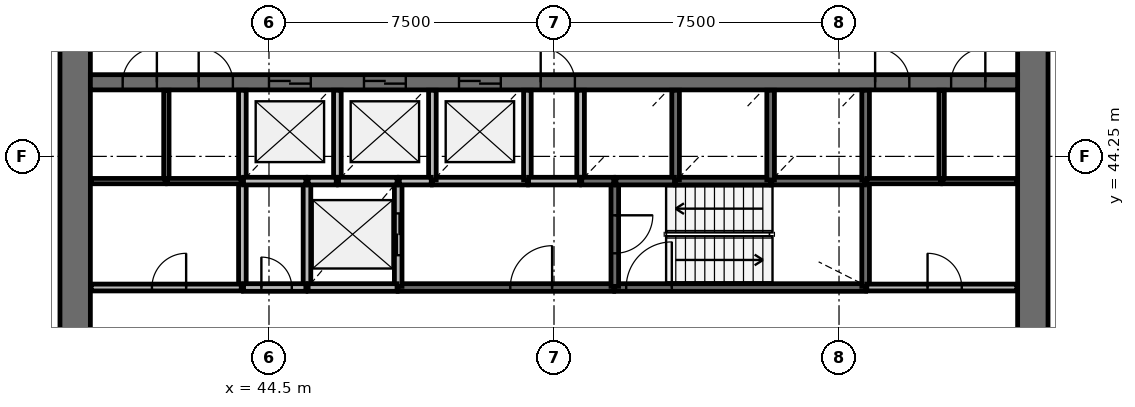
"""IFC4 building model, lengths in metres.
Left out: names, types, materials, properties, quantities, classifications, styles, units other than length and angle.
Written with IfcOpenShell. Run it as: python <this file> out.ifc"""

import sys

from ifc_helpers import new_model, si_unit, direction, frame, frame_2d, origin, place, context, subcontext, project, spatial, rectangle, extrude, source, transform, mapped, element, fill, save


model = new_model("IFC4")
c1 = context("Model", 3, precision=1e-05, world=origin(), true_north=direction((0.0, 1.0)))
c2 = subcontext(c1, "Body", "Model", "MODEL_VIEW")
j1 = project(units=[si_unit("LENGTHUNIT", "METRE"), si_unit("PLANEANGLEUNIT", "RADIAN")], contexts=[c1])
p1 = place(None, origin())
s1 = spatial("IfcSite", under=j1, at=p1, CompositionType="ELEMENT")
p2 = place(p1, origin())
s2 = spatial("IfcBuilding", under=s1, at=p2, CompositionType="ELEMENT")
p3 = place(p2, frame((0.0, 0.0, 83.9)))
s3 = spatial("IfcBuildingStorey", under=s2, at=p3, CompositionType="ELEMENT", Elevation=83.9)
p4 = place(p3, frame((64.6, 38.0, 0.0), z_axis=(0.0, 0.0, 1.0), x_axis=(0.0, 1.0, 0.0)))
e1 = element("IfcWall", 1, at=p4, inside=s3, PredefinedType="SHEAR", context=c2, shape_type="SweptSolid", body=[
    extrude(rectangle(XDim=20.0, YDim=0.8, at=frame_2d((10.0, 0.0))), origin(), (0.0, 0.0, 1.0), 4.1),
])
p5 = place(p4, frame((9.1, 0.0, 0.0)))
e2 = element("IfcOpeningElement", 2, at=p5, cuts=e1, PredefinedType="OPENING", context=c2, shape_type="SweptSolid", body=[
    extrude(rectangle(XDim=1.8, YDim=2.1, at=frame_2d((0.9, 1.05))), frame((0.0, 0.41, 0.0), z_axis=(0.0, -1.0, 0.0), x_axis=(1.0, 0.0, 0.0)), (0.0, 0.0, 1.0), 0.82),
])
p6 = place(p3, frame((39.4, 58.0, 0.0), z_axis=(0.0, 0.0, 1.0), x_axis=(0.0, -1.0, 0.0)))
e3 = element("IfcWall", 3, at=p6, inside=s3, PredefinedType="SHEAR", context=c2, shape_type="SweptSolid", body=[
    extrude(rectangle(XDim=20.0, YDim=0.8, at=frame_2d((10.0, 0.0))), origin(), (0.0, 0.0, 1.0), 4.1),
])
p7 = place(p6, frame((9.1, 0.0, 0.0)))
e4 = element("IfcOpeningElement", 4, at=p7, cuts=e3, PredefinedType="OPENING", context=c2, shape_type="SweptSolid", body=[
    extrude(rectangle(XDim=1.8, YDim=2.1, at=frame_2d((0.9, 1.05))), frame((0.0, 0.41, 0.0), z_axis=(0.0, -1.0, 0.0), x_axis=(1.0, 0.0, 0.0)), (0.0, 0.0, 1.0), 0.82),
])
p8 = place(p3, frame((39.8, 46.2, 0.0), z_axis=(0.0, 0.0, 1.0), x_axis=(1.0, 0.0, 0.0)))
e5 = element("IfcWall", 5, at=p8, inside=s3, PredefinedType="SHEAR", context=c2, shape_type="SweptSolid", body=[
    extrude(rectangle(XDim=24.4, YDim=0.4, at=frame_2d((12.2, 0.0))), origin(), (0.0, 0.0, 1.0), 4.1),
])
p9 = place(p8, frame((4.7, 0.0, 0.0)))
e6 = element("IfcOpeningElement", 6, at=p9, cuts=e5, PredefinedType="OPENING", context=c2, shape_type="SweptSolid", body=[
    extrude(rectangle(XDim=1.1, YDim=2.1, at=frame_2d((0.55, 1.05))), frame((0.0, 0.21, 0.0), z_axis=(0.0, -1.0, 0.0), x_axis=(1.0, 0.0, 0.0)), (0.0, 0.0, 1.0), 0.42),
])
p10 = place(p8, frame((7.2, 0.0, 0.0)))
e7 = element("IfcOpeningElement", 7, at=p10, cuts=e5, PredefinedType="OPENING", context=c2, shape_type="SweptSolid", body=[
    extrude(rectangle(XDim=1.1, YDim=2.1, at=frame_2d((0.55, 1.05))), frame((0.0, 0.21, 0.0), z_axis=(0.0, -1.0, 0.0), x_axis=(1.0, 0.0, 0.0)), (0.0, 0.0, 1.0), 0.42),
])
p11 = place(p8, frame((9.7, 0.0, 0.0)))
e8 = element("IfcOpeningElement", 8, at=p11, cuts=e5, PredefinedType="OPENING", context=c2, shape_type="SweptSolid", body=[
    extrude(rectangle(XDim=1.1, YDim=2.1, at=frame_2d((0.55, 1.05))), frame((0.0, 0.21, 0.0), z_axis=(0.0, -1.0, 0.0), x_axis=(1.0, 0.0, 0.0)), (0.0, 0.0, 1.0), 0.42),
])
p12 = place(p8, frame((20.65, 0.0, 0.0)))
e9 = element("IfcOpeningElement", 9, at=p12, cuts=e5, PredefinedType="OPENING", context=c2, shape_type="SweptSolid", body=[
    extrude(rectangle(XDim=0.9, YDim=2.1, at=frame_2d((0.45, 1.05))), frame((0.0, 0.21, 0.0), z_axis=(0.0, -1.0, 0.0), x_axis=(1.0, 0.0, 0.0)), (0.0, 0.0, 1.0), 0.42),
])
p13 = place(p8, frame((22.65, 0.0, 0.0)))
e10 = element("IfcOpeningElement", 10, at=p13, cuts=e5, PredefinedType="OPENING", context=c2, shape_type="SweptSolid", body=[
    extrude(rectangle(XDim=0.9, YDim=2.1, at=frame_2d((0.45, 1.05))), frame((0.0, 0.21, 0.0), z_axis=(0.0, -1.0, 0.0), x_axis=(1.0, 0.0, 0.0)), (0.0, 0.0, 1.0), 0.42),
])
p14 = place(p8, frame((0.85, 0.0, 0.0)))
e11 = element("IfcOpeningElement", 11, at=p14, cuts=e5, PredefinedType="OPENING", context=c2, shape_type="SweptSolid", body=[
    extrude(rectangle(XDim=0.9, YDim=2.1, at=frame_2d((0.45, 1.05))), frame((0.0, 0.21, 0.0), z_axis=(0.0, -1.0, 0.0), x_axis=(1.0, 0.0, 0.0)), (0.0, 0.0, 1.0), 0.42),
])
p15 = place(p8, frame((2.85, 0.0, 0.0)))
e12 = element("IfcOpeningElement", 12, at=p15, cuts=e5, PredefinedType="OPENING", context=c2, shape_type="SweptSolid", body=[
    extrude(rectangle(XDim=0.9, YDim=2.1, at=frame_2d((0.45, 1.05))), frame((0.0, 0.21, 0.0), z_axis=(0.0, -1.0, 0.0), x_axis=(1.0, 0.0, 0.0)), (0.0, 0.0, 1.0), 0.42),
])
p16 = place(p8, frame((11.85, 0.0, 0.0)))
e13 = element("IfcOpeningElement", 13, at=p16, cuts=e5, PredefinedType="OPENING", context=c2, shape_type="SweptSolid", body=[
    extrude(rectangle(XDim=0.9, YDim=2.1, at=frame_2d((0.45, 1.05))), frame((0.0, 0.21, 0.0), z_axis=(0.0, -1.0, 0.0), x_axis=(1.0, 0.0, 0.0)), (0.0, 0.0, 1.0), 0.42),
])
p17 = place(p3, frame((53.6, 40.8, 0.0), z_axis=(0.0, 0.0, 1.0), x_axis=(1.0, 0.0, 0.0)))
e14 = element("IfcWall", 14, at=p17, inside=s3, PredefinedType="SOLIDWALL", context=c2, shape_type="SweptSolid", body=[
    extrude(rectangle(XDim=6.6, YDim=0.2, at=frame_2d((3.3, 0.0))), origin(), (0.0, 0.0, 1.0), 3.7),
])
p18 = place(p17, frame((0.3, 0.0, 0.0)))
e15 = element("IfcOpeningElement", 15, at=p18, cuts=e14, PredefinedType="OPENING", context=c2, shape_type="SweptSolid", body=[
    extrude(rectangle(XDim=1.2, YDim=2.1, at=frame_2d((0.6, 1.05))), frame((0.0, 0.11, 0.0), z_axis=(0.0, -1.0, 0.0), x_axis=(1.0, 0.0, 0.0)), (0.0, 0.0, 1.0), 0.22),
])
p19 = place(p3, frame((47.9, 40.8, 0.0), z_axis=(0.0, 0.0, 1.0), x_axis=(1.0, 0.0, 0.0)))
e16 = element("IfcWall", 16, at=p19, inside=s3, PredefinedType="SOLIDWALL", context=c2, shape_type="SweptSolid", body=[
    extrude(rectangle(XDim=5.67, YDim=0.2, at=frame_2d((2.835, 0.0))), origin(), (0.0, 0.0, 1.0), 3.7),
])
p20 = place(p19, frame((2.95, 0.0, 0.0)))
e17 = element("IfcOpeningElement", 17, at=p20, cuts=e16, PredefinedType="OPENING", context=c2, shape_type="SweptSolid", body=[
    extrude(rectangle(XDim=1.1, YDim=2.1, at=frame_2d((0.55, 1.05))), frame((0.0, 0.11, 0.0), z_axis=(0.0, -1.0, 0.0), x_axis=(1.0, 0.0, 0.0)), (0.0, 0.0, 1.0), 0.22),
])
for number, where, z_axis, x_axis in (
    (18, (43.8, 43.6, 0.0), (0.0, 0.0, 1.0), (0.0, -1.0, 0.0)),
    (19, (45.5, 43.6, 0.0), (0.0, 0.0, 1.0), (0.0, -1.0, 0.0)),
):
    element("IfcWall", number, at=place(p3, frame(where, z_axis=z_axis, x_axis=x_axis)), inside=s3, PredefinedType="SOLIDWALL", context=c2, shape_type="SweptSolid", body=[
        extrude(rectangle(XDim=2.8, YDim=0.2, at=frame_2d((1.4, 0.0))), origin(), (0.0, 0.0, 1.0), 3.7),
    ])
p21 = place(p3, frame((47.9, 40.83, 0.0), z_axis=(0.0, 0.0, 1.0), x_axis=(0.0, 1.0, 0.0)))
e20 = element("IfcWall", 20, at=p21, inside=s3, PredefinedType="SOLIDWALL", context=c2, shape_type="SweptSolid", body=[
    extrude(rectangle(XDim=2.77, YDim=0.2, at=frame_2d((1.385, 0.0))), origin(), (0.0, 0.0, 1.0), 3.7),
])
p22 = place(p21, frame((0.82, 0.0, 0.0)))
e21 = element("IfcOpeningElement", 21, at=p22, cuts=e20, PredefinedType="OPENING", context=c2, shape_type="SweptSolid", body=[
    extrude(rectangle(XDim=1.1, YDim=2.1, at=frame_2d((0.55, 1.05))), frame((0.0, 0.11, 0.0), z_axis=(0.0, -1.0, 0.0), x_axis=(1.0, 0.0, 0.0)), (0.0, 0.0, 1.0), 0.22),
])
p23 = place(p3, frame((60.2, 40.83, 0.0), z_axis=(0.0, 0.0, 1.0), x_axis=(0.0, 1.0, 0.0)))
e22 = element("IfcWall", 22, at=p23, inside=s3, PredefinedType="SOLIDWALL", context=c2, shape_type="SweptSolid", body=[
    extrude(rectangle(XDim=2.77, YDim=0.2, at=frame_2d((1.385, 0.0))), origin(), (0.0, 0.0, 1.0), 3.7),
])
p24 = place(p3, frame((53.6, 43.6, 0.0), z_axis=(0.0, 0.0, 1.0), x_axis=(0.0, -1.0, 0.0)))
e23 = element("IfcWall", 23, at=p24, inside=s3, PredefinedType="SOLIDWALL", context=c2, shape_type="SweptSolid", body=[
    extrude(rectangle(XDim=2.77, YDim=0.2, at=frame_2d((1.385, 0.0))), origin(), (0.0, 0.0, 1.0), 3.7),
])
p25 = place(p24, frame((0.9, 0.0, 0.0)))
e24 = element("IfcOpeningElement", 24, at=p25, cuts=e23, PredefinedType="OPENING", context=c2, shape_type="SweptSolid", body=[
    extrude(rectangle(XDim=1.0, YDim=2.1, at=frame_2d((0.5, 1.05))), frame((0.0, 0.11, 0.0), z_axis=(0.0, -1.0, 0.0), x_axis=(1.0, 0.0, 0.0)), (0.0, 0.0, 1.0), 0.22),
])
for number, where, z_axis, x_axis in (
    (25, (48.8, 43.6, 0.0), (0.0, 0.0, 1.0), (1.0, 0.0, 0.0)),
    (26, (55.2, 43.6, 0.0), (0.0, 0.0, 1.0), (1.0, 0.0, 0.0)),
):
    element("IfcWall", number, at=place(p3, frame(where, z_axis=z_axis, x_axis=x_axis)), inside=s3, PredefinedType="SOLIDWALL", context=c2, shape_type="SweptSolid", body=[
        extrude(rectangle(XDim=2.5, YDim=0.2, at=frame_2d((1.25, 0.0))), origin(), (0.0, 0.0, 1.0), 3.7),
    ])
p26 = place(p3, frame((57.73, 43.6, 0.0), z_axis=(0.0, 0.0, 1.0), x_axis=(1.0, 0.0, 0.0)))
e27 = element("IfcWall", 27, at=p26, inside=s3, PredefinedType="SOLIDWALL", context=c2, shape_type="SweptSolid", body=[
    extrude(rectangle(XDim=2.44, YDim=0.2, at=frame_2d((1.22, 0.0))), origin(), (0.0, 0.0, 1.0), 3.7),
])
p27 = place(p3, frame((45.53, 40.8, 0.0), z_axis=(0.0, 0.0, 1.0), x_axis=(1.0, 0.0, 0.0)))
e28 = element("IfcWall", 28, at=p27, inside=s3, PredefinedType="SOLIDWALL", context=c2, shape_type="SweptSolid", body=[
    extrude(rectangle(XDim=2.34, YDim=0.2, at=frame_2d((1.17, 0.0))), origin(), (0.0, 0.0, 1.0), 3.7),
])
p28 = place(p3, frame((43.8, 45.99, 0.0), z_axis=(0.0, 0.0, 1.0), x_axis=(0.0, -1.0, 0.0)))
e29 = element("IfcWall", 29, at=p28, inside=s3, PredefinedType="SOLIDWALL", context=c2, shape_type="SweptSolid", body=[
    extrude(rectangle(XDim=2.36, YDim=0.2, at=frame_2d((1.18, 0.0))), origin(), (0.0, 0.0, 1.0), 3.7),
])
p29 = place(p3, frame((46.3, 43.6, 0.0), z_axis=(0.0, 0.0, 1.0), x_axis=(0.0, 1.0, 0.0)))
e30 = element("IfcWall", 30, at=p29, inside=s3, PredefinedType="SOLIDWALL", context=c2, shape_type="SweptSolid", body=[
    extrude(rectangle(XDim=2.39, YDim=0.2, at=frame_2d((1.195, 0.0))), origin(), (0.0, 0.0, 1.0), 3.7),
])
for number, where, z_axis, x_axis in (
    (31, (48.8, 43.63, 0.0), (0.0, 0.0, 1.0), (0.0, 1.0, 0.0)),
    (32, (51.3, 43.63, 0.0), (0.0, 0.0, 1.0), (0.0, 1.0, 0.0)),
):
    element("IfcWall", number, at=place(p3, frame(where, z_axis=z_axis, x_axis=x_axis)), inside=s3, PredefinedType="SOLIDWALL", context=c2, shape_type="SweptSolid", body=[
        extrude(rectangle(XDim=2.36, YDim=0.2, at=frame_2d((1.18, 0.0))), origin(), (0.0, 0.0, 1.0), 3.7),
    ])
p30 = place(p3, frame((52.7, 45.99, 0.0), z_axis=(0.0, 0.0, 1.0), x_axis=(0.0, -1.0, 0.0)))
e33 = element("IfcWall", 33, at=p30, inside=s3, PredefinedType="SOLIDWALL", context=c2, shape_type="SweptSolid", body=[
    extrude(rectangle(XDim=2.39, YDim=0.2, at=frame_2d((1.195, 0.0))), origin(), (0.0, 0.0, 1.0), 3.7),
])
for number, where, z_axis, x_axis in (
    (34, (55.2, 43.63, 0.0), (0.0, 0.0, 1.0), (0.0, 1.0, 0.0)),
    (35, (57.7, 43.63, 0.0), (0.0, 0.0, 1.0), (0.0, 1.0, 0.0)),
    (36, (60.2, 43.63, 0.0), (0.0, 0.0, 1.0), (0.0, 1.0, 0.0)),
):
    element("IfcWall", number, at=place(p3, frame(where, z_axis=z_axis, x_axis=x_axis)), inside=s3, PredefinedType="SOLIDWALL", context=c2, shape_type="SweptSolid", body=[
        extrude(rectangle(XDim=2.36, YDim=0.2, at=frame_2d((1.18, 0.0))), origin(), (0.0, 0.0, 1.0), 3.7),
    ])
p31 = place(p3, frame((43.83, 43.6, 0.0), z_axis=(0.0, 0.0, 1.0), x_axis=(1.0, 0.0, 0.0)))
e37 = element("IfcWall", 37, at=p31, inside=s3, PredefinedType="SOLIDWALL", context=c2, shape_type="SweptSolid", body=[
    extrude(rectangle(XDim=1.64, YDim=0.2, at=frame_2d((0.82, 0.0))), origin(), (0.0, 0.0, 1.0), 3.7),
])
p32 = place(p3, frame((43.83, 40.8, 0.0), z_axis=(0.0, 0.0, 1.0), x_axis=(1.0, 0.0, 0.0)))
e38 = element("IfcWall", 38, at=p32, inside=s3, PredefinedType="SOLIDWALL", context=c2, shape_type="SweptSolid", body=[
    extrude(rectangle(XDim=1.64, YDim=0.2, at=frame_2d((0.82, 0.0))), origin(), (0.0, 0.0, 1.0), 3.7),
])
p33 = place(p32, frame((0.47, 0.0, 0.0)))
e39 = element("IfcOpeningElement", 39, at=p33, cuts=e38, PredefinedType="OPENING", context=c2, shape_type="SweptSolid", body=[
    extrude(rectangle(XDim=0.8, YDim=2.1, at=frame_2d((0.4, 1.05))), frame((0.0, 0.11, 0.0), z_axis=(0.0, -1.0, 0.0), x_axis=(1.0, 0.0, 0.0)), (0.0, 0.0, 1.0), 0.22),
])
for number, where, z_axis, x_axis in (
    (40, (46.33, 43.6, 0.0), (0.0, 0.0, 1.0), (1.0, 0.0, 0.0)),
    (41, (53.63, 43.6, 0.0), (0.0, 0.0, 1.0), (1.0, 0.0, 0.0)),
):
    element("IfcWall", number, at=place(p3, frame(where, z_axis=z_axis, x_axis=x_axis)), inside=s3, PredefinedType="SOLIDWALL", context=c2, shape_type="SweptSolid", body=[
        extrude(rectangle(XDim=1.54, YDim=0.2, at=frame_2d((0.77, 0.0))), origin(), (0.0, 0.0, 1.0), 3.7),
    ])
p34 = place(p3, frame((52.67, 43.6, 0.0), z_axis=(0.0, 0.0, 1.0), x_axis=(-1.0, 0.0, 0.0)))
e42 = element("IfcWall", 42, at=p34, inside=s3, PredefinedType="SOLIDWALL", context=c2, shape_type="SweptSolid", body=[
    extrude(rectangle(XDim=1.34, YDim=0.2, at=frame_2d((0.67, 0.0))), origin(), (0.0, 0.0, 1.0), 3.7),
])
for number, where, z_axis, x_axis in (
    (43, (47.93, 43.6, 0.0), (0.0, 0.0, 1.0), (1.0, 0.0, 0.0)),
    (44, (52.73, 43.6, 0.0), (0.0, 0.0, 1.0), (1.0, 0.0, 0.0)),
):
    element("IfcWall", number, at=place(p3, frame(where, z_axis=z_axis, x_axis=x_axis)), inside=s3, PredefinedType="SOLIDWALL", context=c2, shape_type="SweptSolid", body=[
        extrude(rectangle(XDim=0.84, YDim=0.2, at=frame_2d((0.42, 0.0))), origin(), (0.0, 0.0, 1.0), 3.7),
    ])
p35 = place(p3, frame((45.53, 43.6, 0.0), z_axis=(0.0, 0.0, 1.0), x_axis=(1.0, 0.0, 0.0)))
e45 = element("IfcWall", 45, at=p35, inside=s3, PredefinedType="SOLIDWALL", context=c2, shape_type="SweptSolid", body=[
    extrude(rectangle(XDim=0.74, YDim=0.2, at=frame_2d((0.37, 0.0))), origin(), (0.0, 0.0, 1.0), 3.7),
])
p36 = place(p3, frame((60.23, 40.8, 0.0), z_axis=(0.0, 0.0, 1.0), x_axis=(1.0, 0.0, 0.0)))
e46 = element("IfcWall", 46, at=p36, inside=s3, PredefinedType="PARTITIONING", context=c2, shape_type="SweptSolid", body=[
    extrude(rectangle(XDim=3.95, YDim=0.18, at=frame_2d((1.975, 0.0))), origin(), (0.0, 0.0, 1.0), 3.7),
])
p37 = place(p36, frame((1.6, 0.0, 0.0)))
e47 = element("IfcOpeningElement", 47, at=p37, cuts=e46, PredefinedType="OPENING", context=c2, shape_type="SweptSolid", body=[
    extrude(rectangle(XDim=0.9, YDim=2.1, at=frame_2d((0.45, 1.05))), frame((0.0, 0.1, 0.0), z_axis=(0.0, -1.0, 0.0), x_axis=(1.0, 0.0, 0.0)), (0.0, 0.0, 1.0), 0.2),
])
p38 = place(p3, frame((39.82, 40.8, 0.0), z_axis=(0.0, 0.0, 1.0), x_axis=(1.0, 0.0, 0.0)))
e48 = element("IfcWall", 48, at=p38, inside=s3, PredefinedType="PARTITIONING", context=c2, shape_type="SweptSolid", body=[
    extrude(rectangle(XDim=3.95, YDim=0.18, at=frame_2d((1.975, 0.0))), origin(), (0.0, 0.0, 1.0), 3.7),
])
p39 = place(p38, frame((1.6, 0.0, 0.0)))
e49 = element("IfcOpeningElement", 49, at=p39, cuts=e48, PredefinedType="OPENING", context=c2, shape_type="SweptSolid", body=[
    extrude(rectangle(XDim=0.9, YDim=2.1, at=frame_2d((0.45, 1.05))), frame((0.0, 0.1, 0.0), z_axis=(0.0, -1.0, 0.0), x_axis=(1.0, 0.0, 0.0)), (0.0, 0.0, 1.0), 0.2),
])
for number, where, z_axis, x_axis in (
    (50, (41.8, 43.6, 0.0), (0.0, 0.0, 1.0), (0.0, 1.0, 0.0)),
    (51, (62.2, 43.6, 0.0), (0.0, 0.0, 1.0), (0.0, 1.0, 0.0)),
):
    element("IfcWall", number, at=place(p3, frame(where, z_axis=z_axis, x_axis=x_axis)), inside=s3, PredefinedType="PARTITIONING", context=c2, shape_type="SweptSolid", body=[
        extrude(rectangle(XDim=2.39, YDim=0.14, at=frame_2d((1.195, 0.0))), origin(), (0.0, 0.0, 1.0), 2.9),
    ])
for number, where, z_axis, x_axis in (
    (52, (43.77, 43.6, 0.0), (0.0, 0.0, 1.0), (-1.0, 0.0, 0.0)),
    (53, (60.23, 43.6, 0.0), (0.0, 0.0, 1.0), (1.0, 0.0, 0.0)),
):
    element("IfcWall", number, at=place(p3, frame(where, z_axis=z_axis, x_axis=x_axis)), inside=s3, PredefinedType="PARTITIONING", context=c2, shape_type="SweptSolid", body=[
        extrude(rectangle(XDim=1.94, YDim=0.14, at=frame_2d((0.97, 0.0))), origin(), (0.0, 0.0, 1.0), 2.9),
    ])
for number, where, z_axis, x_axis in (
    (54, (62.23, 43.6, 0.0), (0.0, 0.0, 1.0), (1.0, 0.0, 0.0)),
    (55, (41.77, 43.6, 0.0), (0.0, 0.0, 1.0), (-1.0, 0.0, 0.0)),
):
    element("IfcWall", number, at=place(p3, frame(where, z_axis=z_axis, x_axis=x_axis)), inside=s3, PredefinedType="PARTITIONING", context=c2, shape_type="SweptSolid", body=[
        extrude(rectangle(XDim=1.95, YDim=0.14, at=frame_2d((0.975, 0.0))), origin(), (0.0, 0.0, 1.0), 2.9),
    ])
m1 = source(origin(), c2, "Body", "SweptSolid", [
    extrude(rectangle(XDim=1.1, YDim=2.1, at=frame_2d((0.55, 1.05))), frame((0.0, 0.025, 0.0), z_axis=(0.0, -1.0, 0.0), x_axis=(1.0, 0.0, 0.0)), (0.0, 0.0, 1.0), 0.05),
])
p40 = place(p9, origin())
e56 = element("IfcDoor", 56, at=p40, inside=s3, OperationType="DOUBLE_DOOR_SLIDING", PredefinedType="USERDEFINED", context=c2, shape_type="MappedRepresentation", body=[
    mapped(m1, transform((0.0, 0.0, 0.0), scale=1.0)),
])
fill(e6, e56)
p41 = place(p10, origin())
e57 = element("IfcDoor", 57, at=p41, inside=s3, OperationType="DOUBLE_DOOR_SLIDING", PredefinedType="USERDEFINED", context=c2, shape_type="MappedRepresentation", body=[
    mapped(m1, transform((0.0, 0.0, 0.0), scale=1.0)),
])
fill(e7, e57)
p42 = place(p11, origin())
e58 = element("IfcDoor", 58, at=p42, inside=s3, OperationType="DOUBLE_DOOR_SLIDING", PredefinedType="USERDEFINED", context=c2, shape_type="MappedRepresentation", body=[
    mapped(m1, transform((0.0, 0.0, 0.0), scale=1.0)),
])
fill(e8, e58)
p43 = place(p22, origin())
e59 = element("IfcDoor", 59, at=p43, inside=s3, OperationType="DOUBLE_DOOR_SLIDING", PredefinedType="USERDEFINED", context=c2, shape_type="MappedRepresentation", body=[
    mapped(m1, transform((0.0, 0.0, 0.0), scale=1.0)),
])
fill(e21, e59)
m2 = source(origin(), c2, "Body", "SweptSolid", [
    extrude(rectangle(XDim=1.2, YDim=2.1, at=frame_2d((0.6, 1.05))), frame((0.0, 0.025, 0.0), z_axis=(0.0, -1.0, 0.0), x_axis=(1.0, 0.0, 0.0)), (0.0, 0.0, 1.0), 0.05),
])
p44 = place(p18, origin())
e60 = element("IfcDoor", 60, at=p44, inside=s3, OperationType="SINGLE_SWING_RIGHT", PredefinedType="DOOR", context=c2, shape_type="MappedRepresentation", body=[
    mapped(m2, transform((0.0, 0.0, 0.0), scale=1.0)),
])
fill(e15, e60)
m3 = source(origin(), c2, "Body", "SweptSolid", [
    extrude(rectangle(XDim=1.0, YDim=2.1, at=frame_2d((0.5, 1.05))), frame((0.0, 0.025, 0.0), z_axis=(0.0, -1.0, 0.0), x_axis=(1.0, 0.0, 0.0)), (0.0, 0.0, 1.0), 0.05),
])
p45 = place(p25, origin())
e61 = element("IfcDoor", 61, at=p45, inside=s3, OperationType="SINGLE_SWING_LEFT", PredefinedType="DOOR", context=c2, shape_type="MappedRepresentation", body=[
    mapped(m3, transform((0.0, 0.0, 0.0), scale=1.0)),
])
fill(e24, e61)
m4 = source(origin(), c2, "Body", "SweptSolid", [
    extrude(rectangle(XDim=1.1, YDim=2.1, at=frame_2d((0.55, 1.05))), frame((0.0, 0.025, 0.0), z_axis=(0.0, -1.0, 0.0), x_axis=(1.0, 0.0, 0.0)), (0.0, 0.0, 1.0), 0.05),
])
p46 = place(p20, origin())
e62 = element("IfcDoor", 62, at=p46, inside=s3, OperationType="SINGLE_SWING_RIGHT", PredefinedType="DOOR", context=c2, shape_type="MappedRepresentation", body=[
    mapped(m4, transform((0.0, 0.0, 0.0), scale=1.0)),
])
fill(e17, e62)
m5 = source(origin(), c2, "Body", "SweptSolid", [
    extrude(rectangle(XDim=0.8, YDim=2.1, at=frame_2d((0.4, 1.05))), frame((0.0, 0.025, 0.0), z_axis=(0.0, -1.0, 0.0), x_axis=(1.0, 0.0, 0.0)), (0.0, 0.0, 1.0), 0.05),
])
p47 = place(p33, origin())
e63 = element("IfcDoor", 63, at=p47, inside=s3, OperationType="SINGLE_SWING_LEFT", PredefinedType="DOOR", context=c2, shape_type="MappedRepresentation", body=[
    mapped(m5, transform((0.0, 0.0, 0.0), scale=1.0)),
])
fill(e39, e63)
m6 = source(origin(), c2, "Body", "SweptSolid", [
    extrude(rectangle(XDim=0.9, YDim=2.1, at=frame_2d((0.45, 1.05))), frame((0.0, 0.025, 0.0), z_axis=(0.0, -1.0, 0.0), x_axis=(1.0, 0.0, 0.0)), (0.0, 0.0, 1.0), 0.05),
])
p48 = place(p39, origin())
e64 = element("IfcDoor", 64, at=p48, inside=s3, OperationType="SINGLE_SWING_RIGHT", PredefinedType="DOOR", context=c2, shape_type="MappedRepresentation", body=[
    mapped(m6, transform((0.0, 0.0, 0.0), scale=1.0)),
])
fill(e49, e64)
p49 = place(p12, origin())
e65 = element("IfcDoor", 65, at=p49, inside=s3, OperationType="SINGLE_SWING_LEFT", PredefinedType="DOOR", context=c2, shape_type="MappedRepresentation", body=[
    mapped(m6, transform((0.0, 0.0, 0.0), scale=1.0)),
])
fill(e9, e65)
p50 = place(p13, origin())
e66 = element("IfcDoor", 66, at=p50, inside=s3, OperationType="SINGLE_SWING_RIGHT", PredefinedType="DOOR", context=c2, shape_type="MappedRepresentation", body=[
    mapped(m6, transform((0.0, 0.0, 0.0), scale=1.0)),
])
fill(e10, e66)
p51 = place(p37, origin())
e67 = element("IfcDoor", 67, at=p51, inside=s3, OperationType="SINGLE_SWING_LEFT", PredefinedType="DOOR", context=c2, shape_type="MappedRepresentation", body=[
    mapped(m6, transform((0.0, 0.0, 0.0), scale=1.0)),
])
fill(e47, e67)
p52 = place(p14, origin())
e68 = element("IfcDoor", 68, at=p52, inside=s3, OperationType="SINGLE_SWING_RIGHT", PredefinedType="DOOR", context=c2, shape_type="MappedRepresentation", body=[
    mapped(m6, transform((0.0, 0.0, 0.0), scale=1.0)),
])
fill(e11, e68)
p53 = place(p15, origin())
e69 = element("IfcDoor", 69, at=p53, inside=s3, OperationType="SINGLE_SWING_LEFT", PredefinedType="DOOR", context=c2, shape_type="MappedRepresentation", body=[
    mapped(m6, transform((0.0, 0.0, 0.0), scale=1.0)),
])
fill(e12, e69)
p54 = place(p16, origin())
e70 = element("IfcDoor", 70, at=p54, inside=s3, OperationType="SINGLE_SWING_LEFT", PredefinedType="DOOR", context=c2, shape_type="MappedRepresentation", body=[
    mapped(m6, transform((0.0, 0.0, 0.0), scale=1.0)),
])
fill(e13, e70)
save(model, sys.argv[1])
